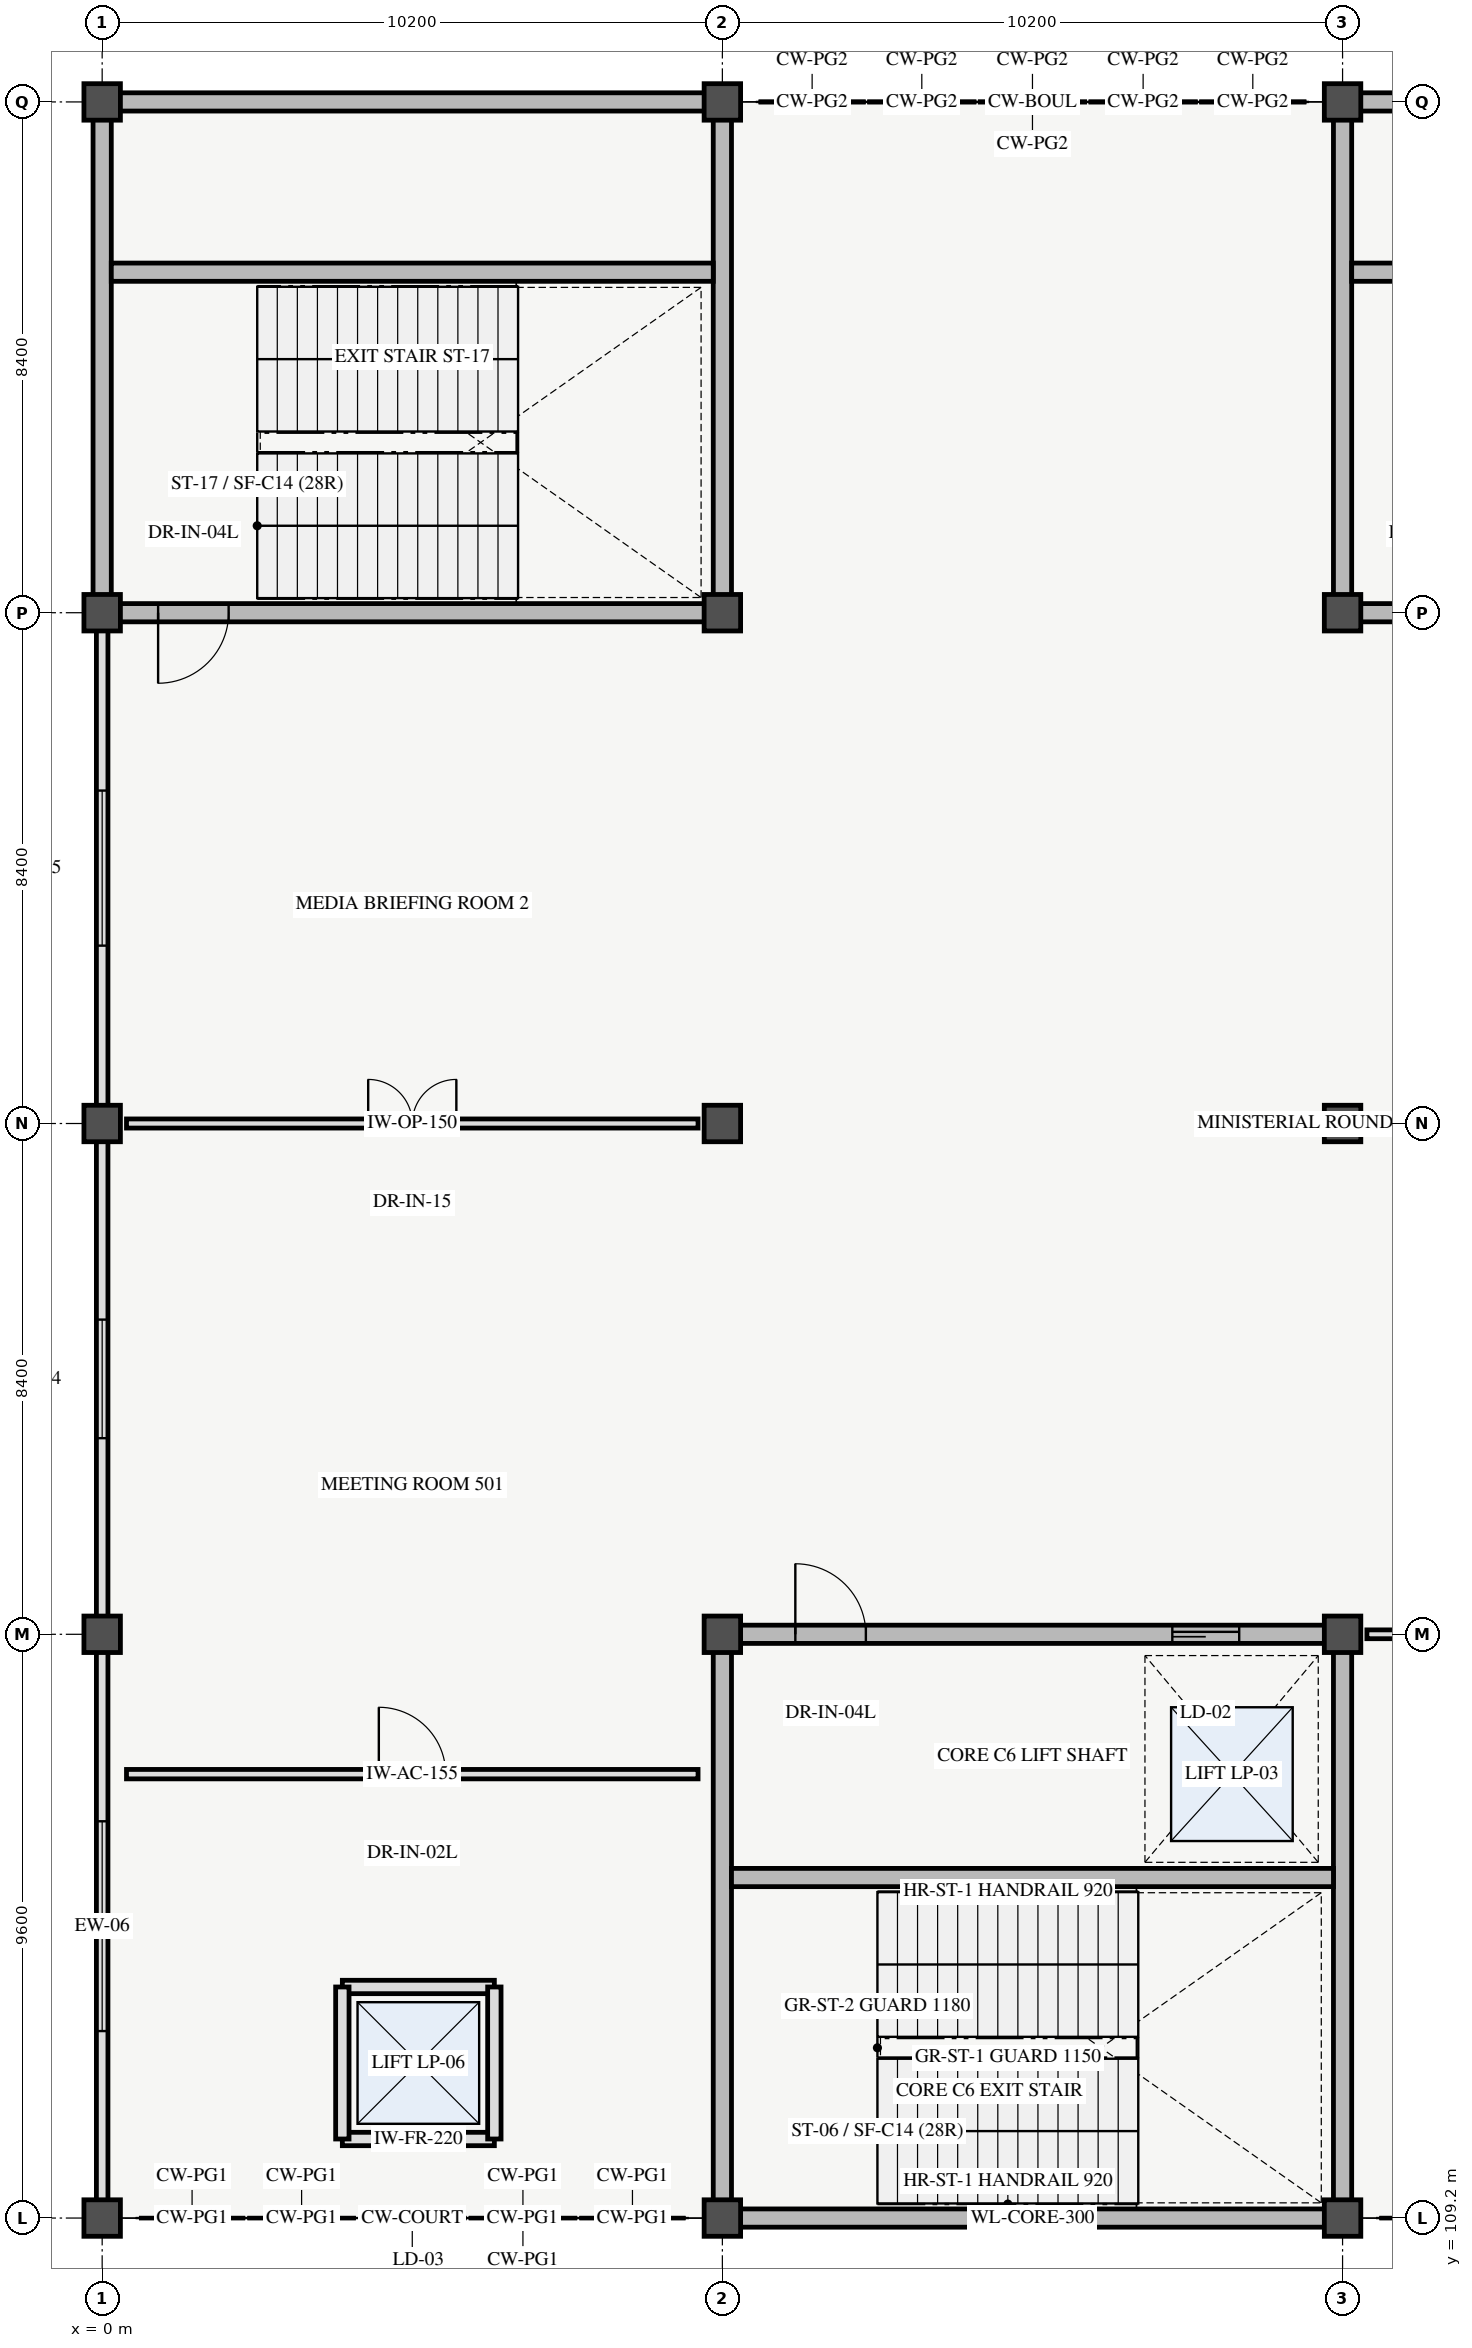
"""IFC4 building model, lengths in metres.
Left out: names, types, materials, properties, quantities, classifications, styles, units other than length and angle.
Written with IfcOpenShell. Run it as: python <this file> out.ifc"""

import sys

from ifc_helpers import new_model, si_unit, direction, frame, frame_2d, origin, origin_2d, place, context, subcontext, project, spatial, rectangle, extrude, element, fill, save


model = new_model("IFC4")
c1 = context("Model", 3, precision=1e-05, world=origin(), true_north=direction((0.0, 1.0)))
c2 = subcontext(c1, "Body", "Model", "MODEL_VIEW")
j1 = project(units=[si_unit("LENGTHUNIT", "METRE"), si_unit("PLANEANGLEUNIT", "RADIAN")], contexts=[c1])
p1 = place(None, origin())
s1 = spatial("IfcSite", under=j1, at=p1, CompositionType="ELEMENT")
p2 = place(p1, origin())
s2 = spatial("IfcBuilding", under=s1, at=p2, CompositionType="ELEMENT")
p3 = place(p2, frame((0.0, 0.0, 19.2)))
s3 = spatial("IfcBuildingStorey", under=s2, at=p3, CompositionType="ELEMENT", Elevation=19.2)
for number, where, z_axis, x_axis in (
    (1, (0.0, 109.2, 0.0), (0.0, 0.0, 1.0), (1.0, 0.0, 0.0)),
    (2, (0.0, 118.8, 0.0), (0.0, 0.0, 1.0), (1.0, 0.0, 0.0)),
    (3, (0.0, 127.2, 0.0), (0.0, 0.0, 1.0), (1.0, 0.0, 0.0)),
    (4, (0.0, 135.6, 0.0), (0.0, 0.0, 1.0), (1.0, 0.0, 0.0)),
    (5, (0.0, 144.0, 0.0), (0.0, 0.0, 1.0), (1.0, 0.0, 0.0)),
    (6, (10.2, 109.2, 0.0), (0.0, 0.0, 1.0), (1.0, 0.0, 0.0)),
    (7, (10.2, 118.8, 0.0), (0.0, 0.0, 1.0), (1.0, 0.0, 0.0)),
    (8, (10.2, 127.2, 0.0), (0.0, 0.0, 1.0), (1.0, 0.0, 0.0)),
    (9, (10.2, 135.6, 0.0), (0.0, 0.0, 1.0), (1.0, 0.0, 0.0)),
    (10, (10.2, 144.0, 0.0), (0.0, 0.0, 1.0), (1.0, 0.0, 0.0)),
    (11, (20.4, 109.2, 0.0), (0.0, 0.0, 1.0), (1.0, 0.0, 0.0)),
    (12, (20.4, 118.8, 0.0), (0.0, 0.0, 1.0), (1.0, 0.0, 0.0)),
    (13, (20.4, 127.2, 0.0), (0.0, 0.0, 1.0), (1.0, 0.0, 0.0)),
    (14, (20.4, 135.6, 0.0), (0.0, 0.0, 1.0), (1.0, 0.0, 0.0)),
    (15, (20.4, 144.0, 0.0), (0.0, 0.0, 1.0), (1.0, 0.0, 0.0)),
):
    element("IfcColumn", number, at=place(p3, frame(where, z_axis=z_axis, x_axis=x_axis)), inside=s3, PredefinedType="COLUMN", context=c2, shape_type="SweptSolid", body=[
        extrude(rectangle(XDim=0.6, YDim=0.6, at=origin_2d()), origin(), (0.0, 0.0, 1.0), 4.2),
    ])
p4 = place(p3, frame((10.2, 109.2, 0.0), z_axis=(0.0, 0.0, 1.0), x_axis=(1.0, 0.0, 0.0)))
e16 = element("IfcWall", 16, at=p4, inside=s3, PredefinedType="SHEAR", context=c2, shape_type="SweptSolid", body=[
    extrude(rectangle(XDim=10.2, YDim=0.3, at=frame_2d((5.1, 0.0))), origin(), (0.0, 0.0, 1.0), 4.2),
])
p5 = place(p3, frame((10.2, 118.8, 0.0), z_axis=(0.0, 0.0, 1.0), x_axis=(1.0, 0.0, 0.0)))
e17 = element("IfcWall", 17, at=p5, inside=s3, PredefinedType="SHEAR", context=c2, shape_type="SweptSolid", body=[
    extrude(rectangle(XDim=10.2, YDim=0.3, at=frame_2d((5.1, 0.0))), origin(), (0.0, 0.0, 1.0), 4.2),
])
p6 = place(p5, frame((1.2, 0.0, 0.0)))
e18 = element("IfcOpeningElement", 18, at=p6, cuts=e17, PredefinedType="OPENING", context=c2, shape_type="SweptSolid", body=[
    extrude(rectangle(XDim=1.16, YDim=2.2, at=frame_2d((0.58, 1.1))), frame((0.0, 0.16, 0.0), z_axis=(0.0, -1.0, 0.0), x_axis=(1.0, 0.0, 0.0)), (0.0, 0.0, 1.0), 0.32),
])
p7 = place(p5, frame((7.4, 0.0, 0.0)))
e19 = element("IfcOpeningElement", 19, at=p7, cuts=e17, PredefinedType="OPENING", context=c2, shape_type="SweptSolid", body=[
    extrude(rectangle(XDim=1.1, YDim=2.2, at=frame_2d((0.55, 1.1))), frame((0.0, 0.16, 0.0), z_axis=(0.0, -1.0, 0.0), x_axis=(1.0, 0.0, 0.0)), (0.0, 0.0, 1.0), 0.32),
])
for number, where, z_axis, x_axis in (
    (20, (10.2, 109.2, 0.0), (0.0, 0.0, 1.0), (0.0, 1.0, 0.0)),
    (21, (20.4, 109.2, 0.0), (0.0, 0.0, 1.0), (0.0, 1.0, 0.0)),
):
    element("IfcWall", number, at=place(p3, frame(where, z_axis=z_axis, x_axis=x_axis)), inside=s3, PredefinedType="SHEAR", context=c2, shape_type="SweptSolid", body=[
        extrude(rectangle(XDim=9.6, YDim=0.3, at=frame_2d((4.8, 0.0))), origin(), (0.0, 0.0, 1.0), 4.2),
    ])
p8 = place(p3, frame((0.0, 109.44, 0.0), z_axis=(0.0, 0.0, 1.0), x_axis=(0.0, 1.0, 0.0)))
e22 = element("IfcWall", 22, at=p8, inside=s3, PredefinedType="STANDARD", context=c2, shape_type="SweptSolid", body=[
    extrude(rectangle(XDim=9.12, YDim=0.19, at=frame_2d((4.56, 0.0))), origin(), (0.0, 0.0, 1.0), 3.06),
])
p9 = place(p8, frame((2.835, 0.0, 0.9)))
e23 = element("IfcOpeningElement", 23, at=p9, cuts=e22, PredefinedType="OPENING", context=c2, shape_type="SweptSolid", body=[
    extrude(rectangle(XDim=3.45, YDim=2.25, at=frame_2d((1.725, 1.125))), frame((0.0, 0.105, 0.0), z_axis=(0.0, -1.0, 0.0), x_axis=(1.0, 0.0, 0.0)), (0.0, 0.0, 1.0), 0.21),
])
p10 = place(p3, frame((0.0, 119.04, 0.0), z_axis=(0.0, 0.0, 1.0), x_axis=(0.0, 1.0, 0.0)))
e24 = element("IfcWall", 24, at=p10, inside=s3, PredefinedType="STANDARD", context=c2, shape_type="SweptSolid", body=[
    extrude(rectangle(XDim=7.92, YDim=0.19, at=frame_2d((3.96, 0.0))), origin(), (0.0, 0.0, 1.0), 3.06),
])
p11 = place(p10, frame((2.985, 0.0, 0.9)))
e25 = element("IfcOpeningElement", 25, at=p11, cuts=e24, PredefinedType="OPENING", context=c2, shape_type="SweptSolid", body=[
    extrude(rectangle(XDim=1.95, YDim=1.65, at=frame_2d((0.975, 0.825))), frame((0.0, 0.105, 0.0), z_axis=(0.0, -1.0, 0.0), x_axis=(1.0, 0.0, 0.0)), (0.0, 0.0, 1.0), 0.21),
])
p12 = place(p3, frame((0.0, 127.44, 0.0), z_axis=(0.0, 0.0, 1.0), x_axis=(0.0, 1.0, 0.0)))
e26 = element("IfcWall", 26, at=p12, inside=s3, PredefinedType="STANDARD", context=c2, shape_type="SweptSolid", body=[
    extrude(rectangle(XDim=7.92, YDim=0.19, at=frame_2d((3.96, 0.0))), origin(), (0.0, 0.0, 1.0), 3.06),
])
p13 = place(p12, frame((2.685, 0.0, 0.9)))
e27 = element("IfcOpeningElement", 27, at=p13, cuts=e26, PredefinedType="OPENING", context=c2, shape_type="SweptSolid", body=[
    extrude(rectangle(XDim=2.55, YDim=2.25, at=frame_2d((1.275, 1.125))), frame((0.0, 0.105, 0.0), z_axis=(0.0, -1.0, 0.0), x_axis=(1.0, 0.0, 0.0)), (0.0, 0.0, 1.0), 0.21),
])
p14 = place(p3, frame((10.35, 114.8, 0.0), z_axis=(0.0, 0.0, 1.0), x_axis=(1.0, 0.0, 0.0)))
e28 = element("IfcWall", 28, at=p14, inside=s3, PredefinedType="SHEAR", context=c2, shape_type="SweptSolid", body=[
    extrude(rectangle(XDim=9.9, YDim=0.3, at=frame_2d((4.95, 0.0))), origin(), (0.0, 0.0, 1.0), 4.2),
])
p15 = place(p3, frame((20.4, 135.6, 0.0), z_axis=(0.0, 0.0, 1.0), x_axis=(1.0, 0.0, 0.0)))
e29 = element("IfcWall", 29, at=p15, inside=s3, PredefinedType="SHEAR", context=c2, shape_type="SweptSolid", body=[
    extrude(rectangle(XDim=10.2, YDim=0.3, at=frame_2d((5.1, 0.0))), origin(), (0.0, 0.0, 1.0), 4.2),
])
p16 = place(p15, frame((0.92, 0.0, 0.0)))
e30 = element("IfcOpeningElement", 30, at=p16, cuts=e29, PredefinedType="OPENING", context=c2, shape_type="SweptSolid", body=[
    extrude(rectangle(XDim=1.16, YDim=2.2, at=frame_2d((0.58, 1.1))), frame((0.0, 0.16, 0.0), z_axis=(0.0, -1.0, 0.0), x_axis=(1.0, 0.0, 0.0)), (0.0, 0.0, 1.0), 0.32),
])
p17 = place(p3, frame((20.4, 144.0, 0.0), z_axis=(0.0, 0.0, 1.0), x_axis=(1.0, 0.0, 0.0)))
e31 = element("IfcWall", 31, at=p17, inside=s3, PredefinedType="SHEAR", context=c2, shape_type="SweptSolid", body=[
    extrude(rectangle(XDim=10.2, YDim=0.3, at=frame_2d((5.1, 0.0))), origin(), (0.0, 0.0, 1.0), 4.2),
])
p18 = place(p3, frame((20.4, 135.6, 0.0), z_axis=(0.0, 0.0, 1.0), x_axis=(0.0, 1.0, 0.0)))
e32 = element("IfcWall", 32, at=p18, inside=s3, PredefinedType="SHEAR", context=c2, shape_type="SweptSolid", body=[
    extrude(rectangle(XDim=8.4, YDim=0.3, at=frame_2d((4.2, 0.0))), origin(), (0.0, 0.0, 1.0), 4.2),
])
p19 = place(p3, frame((20.55, 141.2, 0.0), z_axis=(0.0, 0.0, 1.0), x_axis=(1.0, 0.0, 0.0)))
e33 = element("IfcWall", 33, at=p19, inside=s3, PredefinedType="SHEAR", context=c2, shape_type="SweptSolid", body=[
    extrude(rectangle(XDim=9.9, YDim=0.3, at=frame_2d((4.95, 0.0))), origin(), (0.0, 0.0, 1.0), 4.2),
])
p20 = place(p3, frame((0.0, 135.6, 0.0), z_axis=(0.0, 0.0, 1.0), x_axis=(1.0, 0.0, 0.0)))
e34 = element("IfcWall", 34, at=p20, inside=s3, PredefinedType="SHEAR", context=c2, shape_type="SweptSolid", body=[
    extrude(rectangle(XDim=10.2, YDim=0.3, at=frame_2d((5.1, 0.0))), origin(), (0.0, 0.0, 1.0), 4.2),
])
p21 = place(p20, frame((0.92, 0.0, 0.0)))
e35 = element("IfcOpeningElement", 35, at=p21, cuts=e34, PredefinedType="OPENING", context=c2, shape_type="SweptSolid", body=[
    extrude(rectangle(XDim=1.16, YDim=2.2, at=frame_2d((0.58, 1.1))), frame((0.0, 0.16, 0.0), z_axis=(0.0, -1.0, 0.0), x_axis=(1.0, 0.0, 0.0)), (0.0, 0.0, 1.0), 0.32),
])
p22 = place(p3, frame((0.0, 144.0, 0.0), z_axis=(0.0, 0.0, 1.0), x_axis=(1.0, 0.0, 0.0)))
e36 = element("IfcWall", 36, at=p22, inside=s3, PredefinedType="SHEAR", context=c2, shape_type="SweptSolid", body=[
    extrude(rectangle(XDim=10.2, YDim=0.3, at=frame_2d((5.1, 0.0))), origin(), (0.0, 0.0, 1.0), 4.2),
])
for number, where, z_axis, x_axis in (
    (37, (0.0, 135.6, 0.0), (0.0, 0.0, 1.0), (0.0, 1.0, 0.0)),
    (38, (10.2, 135.6, 0.0), (0.0, 0.0, 1.0), (0.0, 1.0, 0.0)),
):
    element("IfcWall", number, at=place(p3, frame(where, z_axis=z_axis, x_axis=x_axis)), inside=s3, PredefinedType="SHEAR", context=c2, shape_type="SweptSolid", body=[
        extrude(rectangle(XDim=8.4, YDim=0.3, at=frame_2d((4.2, 0.0))), origin(), (0.0, 0.0, 1.0), 4.2),
    ])
p23 = place(p3, frame((0.15, 141.2, 0.0), z_axis=(0.0, 0.0, 1.0), x_axis=(1.0, 0.0, 0.0)))
e39 = element("IfcWall", 39, at=p23, inside=s3, PredefinedType="SHEAR", context=c2, shape_type="SweptSolid", body=[
    extrude(rectangle(XDim=9.9, YDim=0.3, at=frame_2d((4.95, 0.0))), origin(), (0.0, 0.0, 1.0), 4.2),
])
p24 = place(p3, frame((3.95, 110.5, 0.0), z_axis=(0.0, 0.0, 1.0), x_axis=(1.0, 0.0, 0.0)))
e40 = element("IfcWall", 40, at=p24, inside=s3, PredefinedType="PARTITIONING", context=c2, shape_type="SweptSolid", body=[
    extrude(rectangle(XDim=2.5, YDim=0.22, at=frame_2d((1.25, 0.0))), origin(), (0.0, 0.0, 1.0), 3.91),
])
p25 = place(p24, frame((0.575, 0.0, 0.0)))
e41 = element("IfcOpeningElement", 41, at=p25, cuts=e40, PredefinedType="OPENING", context=c2, shape_type="SweptSolid", body=[
    extrude(rectangle(XDim=1.35, YDim=2.3, at=frame_2d((0.675, 1.15))), frame((0.0, 0.12, 0.0), z_axis=(0.0, -1.0, 0.0), x_axis=(1.0, 0.0, 0.0)), (0.0, 0.0, 1.0), 0.24),
])
for number, where, z_axis, x_axis in (
    (42, (3.95, 113.0, 0.0), (0.0, 0.0, 1.0), (1.0, 0.0, 0.0)),
    (43, (3.95, 110.5, 0.0), (0.0, 0.0, 1.0), (0.0, 1.0, 0.0)),
    (44, (6.45, 110.5, 0.0), (0.0, 0.0, 1.0), (0.0, 1.0, 0.0)),
):
    element("IfcWall", number, at=place(p3, frame(where, z_axis=z_axis, x_axis=x_axis)), inside=s3, PredefinedType="PARTITIONING", context=c2, shape_type="SweptSolid", body=[
        extrude(rectangle(XDim=2.5, YDim=0.22, at=frame_2d((1.25, 0.0))), origin(), (0.0, 0.0, 1.0), 3.91),
    ])
p26 = place(p3, frame((0.4, 127.2, 0.0), z_axis=(0.0, 0.0, 1.0), x_axis=(1.0, 0.0, 0.0)))
e45 = element("IfcWall", 45, at=p26, inside=s3, PredefinedType="MOVABLE", context=c2, shape_type="SweptSolid", body=[
    extrude(rectangle(XDim=9.4, YDim=0.15, at=frame_2d((4.7, 0.0))), origin(), (0.0, 0.0, 1.0), 3.06),
])
p27 = place(p26, frame((3.975, 0.0, 0.0)))
e46 = element("IfcOpeningElement", 46, at=p27, cuts=e45, PredefinedType="OPENING", context=c2, shape_type="SweptSolid", body=[
    extrude(rectangle(XDim=1.45, YDim=2.22, at=frame_2d((0.725, 1.11))), frame((0.0, 0.085, 0.0), z_axis=(0.0, -1.0, 0.0), x_axis=(1.0, 0.0, 0.0)), (0.0, 0.0, 1.0), 0.17),
])
p28 = place(p3, frame((0.4, 116.5, 0.0), z_axis=(0.0, 0.0, 1.0), x_axis=(1.0, 0.0, 0.0)))
e47 = element("IfcWall", 47, at=p28, inside=s3, PredefinedType="PARTITIONING", context=c2, shape_type="SweptSolid", body=[
    extrude(rectangle(XDim=9.4, YDim=0.155, at=frame_2d((4.7, 0.0))), origin(), (0.0, 0.0, 1.0), 3.06),
])
p29 = place(p28, frame((4.15, 0.0, 0.0)))
e48 = element("IfcOpeningElement", 48, at=p29, cuts=e47, PredefinedType="OPENING", context=c2, shape_type="SweptSolid", body=[
    extrude(rectangle(XDim=1.1, YDim=2.2, at=frame_2d((0.55, 1.1))), frame((0.0, 0.087, 0.0), z_axis=(0.0, -1.0, 0.0), x_axis=(1.0, 0.0, 0.0)), (0.0, 0.0, 1.0), 0.175),
])
p30 = place(p3, frame((20.8, 118.8, 0.0), z_axis=(0.0, 0.0, 1.0), x_axis=(1.0, 0.0, 0.0)))
e49 = element("IfcWall", 49, at=p30, inside=s3, PredefinedType="PARTITIONING", context=c2, shape_type="SweptSolid", body=[
    extrude(rectangle(XDim=9.4, YDim=0.145, at=frame_2d((4.7, 0.0))), origin(), (0.0, 0.0, 1.0), 3.06),
])
p31 = place(p30, frame((4.125, 0.0, 0.0)))
e50 = element("IfcOpeningElement", 50, at=p31, cuts=e49, PredefinedType="OPENING", context=c2, shape_type="SweptSolid", body=[
    extrude(rectangle(XDim=1.15, YDim=2.2, at=frame_2d((0.575, 1.1))), frame((0.0, 0.083, 0.0), z_axis=(0.0, -1.0, 0.0), x_axis=(1.0, 0.0, 0.0)), (0.0, 0.0, 1.0), 0.165),
])
p32 = place(p9, origin())
e51 = element("IfcWindow", 51, at=p32, inside=s3, PartitioningType="TRIPLE_PANEL_VERTICAL", PredefinedType="WINDOW", context=c2, shape_type="SweptSolid", body=[
    extrude(rectangle(XDim=3.45, YDim=2.25, at=frame_2d((1.725, 1.125))), frame((0.0, 0.03, 0.0), z_axis=(0.0, -1.0, 0.0), x_axis=(1.0, 0.0, 0.0)), (0.0, 0.0, 1.0), 0.06),
])
fill(e23, e51)
p33 = place(p11, origin())
e52 = element("IfcWindow", 52, at=p33, inside=s3, PartitioningType="DOUBLE_PANEL_VERTICAL", PredefinedType="WINDOW", context=c2, shape_type="SweptSolid", body=[
    extrude(rectangle(XDim=1.95, YDim=1.65, at=frame_2d((0.975, 0.825))), frame((0.0, 0.03, 0.0), z_axis=(0.0, -1.0, 0.0), x_axis=(1.0, 0.0, 0.0)), (0.0, 0.0, 1.0), 0.06),
])
fill(e25, e52)
p34 = place(p13, origin())
e53 = element("IfcWindow", 53, at=p34, inside=s3, PartitioningType="DOUBLE_PANEL_VERTICAL", PredefinedType="WINDOW", context=c2, shape_type="SweptSolid", body=[
    extrude(rectangle(XDim=2.55, YDim=2.25, at=frame_2d((1.275, 1.125))), frame((0.0, 0.03, 0.0), z_axis=(0.0, -1.0, 0.0), x_axis=(1.0, 0.0, 0.0)), (0.0, 0.0, 1.0), 0.06),
])
fill(e27, e53)
p35 = place(p6, origin())
e54 = element("IfcDoor", 54, at=p35, inside=s3, OperationType="SINGLE_SWING_LEFT", PredefinedType="DOOR", context=c2, shape_type="SweptSolid", body=[
    extrude(rectangle(XDim=1.16, YDim=2.2, at=frame_2d((0.58, 1.1))), frame((0.0, 0.025, 0.0), z_axis=(0.0, -1.0, 0.0), x_axis=(1.0, 0.0, 0.0)), (0.0, 0.0, 1.0), 0.05),
])
fill(e18, e54)
p36 = place(p7, origin())
e55 = element("IfcDoor", 55, at=p36, inside=s3, OperationType="SLIDING_TO_RIGHT", PredefinedType="DOOR", context=c2, shape_type="SweptSolid", body=[
    extrude(rectangle(XDim=1.1, YDim=2.2, at=frame_2d((0.55, 1.1))), frame((0.0, 0.025, 0.0), z_axis=(0.0, -1.0, 0.0), x_axis=(1.0, 0.0, 0.0)), (0.0, 0.0, 1.0), 0.05),
])
fill(e19, e55)
p37 = place(p21, origin())
e56 = element("IfcDoor", 56, at=p37, inside=s3, OperationType="SINGLE_SWING_LEFT", PredefinedType="DOOR", context=c2, shape_type="SweptSolid", body=[
    extrude(rectangle(XDim=1.16, YDim=2.2, at=frame_2d((0.58, 1.1))), frame((0.0, 0.025, 0.0), z_axis=(0.0, -1.0, 0.0), x_axis=(1.0, 0.0, 0.0)), (0.0, 0.0, 1.0), 0.05),
])
fill(e35, e56)
p38 = place(p25, origin())
e57 = element("IfcDoor", 57, at=p38, inside=s3, OperationType="DOUBLE_DOOR_SLIDING", PredefinedType="DOOR", context=c2, shape_type="SweptSolid", body=[
    extrude(rectangle(XDim=1.35, YDim=2.3, at=frame_2d((0.675, 1.15))), frame((0.0, 0.025, 0.0), z_axis=(0.0, -1.0, 0.0), x_axis=(1.0, 0.0, 0.0)), (0.0, 0.0, 1.0), 0.05),
])
fill(e41, e57)
p39 = place(p27, origin())
e58 = element("IfcDoor", 58, at=p39, inside=s3, OperationType="DOUBLE_DOOR_SINGLE_SWING", PredefinedType="DOOR", context=c2, shape_type="SweptSolid", body=[
    extrude(rectangle(XDim=1.45, YDim=2.22, at=frame_2d((0.725, 1.11))), frame((0.0, 0.025, 0.0), z_axis=(0.0, -1.0, 0.0), x_axis=(1.0, 0.0, 0.0)), (0.0, 0.0, 1.0), 0.05),
])
fill(e46, e58)
p40 = place(p29, origin())
e59 = element("IfcDoor", 59, at=p40, inside=s3, OperationType="SINGLE_SWING_LEFT", PredefinedType="DOOR", context=c2, shape_type="SweptSolid", body=[
    extrude(rectangle(XDim=1.1, YDim=2.2, at=frame_2d((0.55, 1.1))), frame((0.0, 0.025, 0.0), z_axis=(0.0, -1.0, 0.0), x_axis=(1.0, 0.0, 0.0)), (0.0, 0.0, 1.0), 0.05),
])
fill(e48, e59)
save(model, sys.argv[1])
